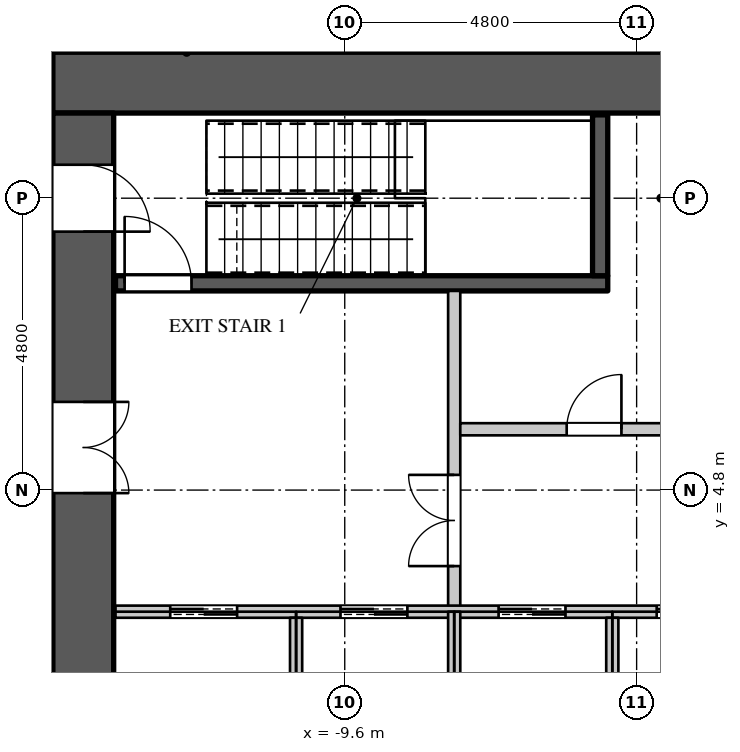
"""IFC4 building model, lengths in metres.
Left out: names, types, materials, properties, quantities, classifications, styles, units other than length and angle.
Written with IfcOpenShell. Run it as: python <this file> out.ifc"""

import sys

from ifc_helpers import new_model, si_unit, direction, frame, frame_2d, origin, place, context, subcontext, project, spatial, rectangle, extrude, element, fill, save


model = new_model("IFC4")
c1 = context("Model", 3, precision=1e-05, world=origin(), true_north=direction((0.0, 1.0)))
c2 = subcontext(c1, "Body", "Model", "MODEL_VIEW")
j1 = project(units=[si_unit("LENGTHUNIT", "METRE"), si_unit("PLANEANGLEUNIT", "RADIAN")], contexts=[c1])
p1 = place(None, origin())
s1 = spatial("IfcSite", under=j1, at=p1, CompositionType="ELEMENT")
p2 = place(p1, origin())
s2 = spatial("IfcBuilding", under=s1, at=p2, CompositionType="ELEMENT")
p3 = place(p2, frame((0.0, 0.0, 38.1)))
s3 = spatial("IfcBuildingStorey", under=s2, at=p3, CompositionType="ELEMENT", Elevation=38.1)
p4 = place(p3, frame((-14.4, 11.5, 0.0), z_axis=(0.0, 0.0, 1.0), x_axis=(1.0, 0.0, 0.0)))
e1 = element("IfcWall", 1, at=p4, inside=s3, PredefinedType="SHEAR", context=c2, shape_type="SweptSolid", body=[
    extrude(rectangle(XDim=28.8, YDim=1.0, at=frame_2d((14.4, 0.0))), origin(), (0.0, 0.0, 1.0), 4.2),
])
p5 = place(p3, frame((-13.9, -11.0, 0.0), z_axis=(0.0, 0.0, 1.0), x_axis=(0.0, 1.0, 0.0)))
e2 = element("IfcWall", 2, at=p5, inside=s3, PredefinedType="SHEAR", context=c2, shape_type="SweptSolid", body=[
    extrude(rectangle(XDim=22.0, YDim=1.0, at=frame_2d((11.0, 0.0))), origin(), (0.0, 0.0, 1.0), 4.2),
])
p6 = place(p5, frame((20.05, 0.0, 0.0)))
e3 = element("IfcOpeningElement", 3, at=p6, cuts=e2, PredefinedType="OPENING", context=c2, shape_type="SweptSolid", body=[
    extrude(rectangle(XDim=1.1, YDim=2.2, at=frame_2d((0.55, 1.1))), frame((0.0, 0.51, 0.0), z_axis=(0.0, -1.0, 0.0), x_axis=(1.0, 0.0, 0.0)), (0.0, 0.0, 1.0), 1.02),
])
p7 = place(p5, frame((0.85, 0.0, 0.0)))
e4 = element("IfcOpeningElement", 4, at=p7, cuts=e2, PredefinedType="OPENING", context=c2, shape_type="SweptSolid", body=[
    extrude(rectangle(XDim=1.1, YDim=2.2, at=frame_2d((0.55, 1.1))), frame((0.0, 0.51, 0.0), z_axis=(0.0, -1.0, 0.0), x_axis=(1.0, 0.0, 0.0)), (0.0, 0.0, 1.0), 1.02),
])
p8 = place(p5, frame((15.75, 0.0, 0.0)))
e5 = element("IfcOpeningElement", 5, at=p8, cuts=e2, PredefinedType="OPENING", context=c2, shape_type="SweptSolid", body=[
    extrude(rectangle(XDim=1.5, YDim=2.4, at=frame_2d((0.75, 1.2))), frame((0.0, 0.51, 0.0), z_axis=(0.0, -1.0, 0.0), x_axis=(1.0, 0.0, 0.0)), (0.0, 0.0, 1.0), 1.02),
])
p9 = place(p5, frame((4.75, 0.0, 0.0)))
e6 = element("IfcOpeningElement", 6, at=p9, cuts=e2, PredefinedType="OPENING", context=c2, shape_type="SweptSolid", body=[
    extrude(rectangle(XDim=1.5, YDim=2.4, at=frame_2d((0.75, 1.2))), frame((0.0, 0.51, 0.0), z_axis=(0.0, -1.0, 0.0), x_axis=(1.0, 0.0, 0.0)), (0.0, 0.0, 1.0), 1.02),
])
p10 = place(p3, frame((-7.8, 2.8, 0.0), z_axis=(0.0, 0.0, 1.0), x_axis=(0.0, 1.0, 0.0)))
e7 = element("IfcWall", 7, at=p10, inside=s3, PredefinedType="PARTITIONING", context=c2, shape_type="SweptSolid", body=[
    extrude(rectangle(XDim=5.275, YDim=0.2, at=frame_2d((2.637, 0.0))), origin(), (0.0, 0.0, 1.0), 3.95),
])
p11 = place(p10, frame((0.75, 0.0, 0.0)))
e8 = element("IfcOpeningElement", 8, at=p11, cuts=e7, PredefinedType="OPENING", context=c2, shape_type="SweptSolid", body=[
    extrude(rectangle(XDim=1.5, YDim=2.4, at=frame_2d((0.75, 1.2))), frame((0.0, 0.11, 0.0), z_axis=(0.0, -1.0, 0.0), x_axis=(1.0, 0.0, 0.0)), (0.0, 0.0, 1.0), 0.22),
])
p12 = place(p3, frame((-7.7, 5.8, 0.0), z_axis=(0.0, 0.0, 1.0), x_axis=(1.0, 0.0, 0.0)))
e9 = element("IfcWall", 9, at=p12, inside=s3, PredefinedType="PARTITIONING", context=c2, shape_type="SweptSolid", body=[
    extrude(rectangle(XDim=16.32, YDim=0.2, at=frame_2d((8.16, 0.0))), origin(), (0.0, 0.0, 1.0), 3.95),
])
p13 = place(p12, frame((1.75, 0.0, 0.0)))
e10 = element("IfcOpeningElement", 10, at=p13, cuts=e9, PredefinedType="OPENING", context=c2, shape_type="SweptSolid", body=[
    extrude(rectangle(XDim=0.9, YDim=2.2, at=frame_2d((0.45, 1.1))), frame((0.0, 0.11, 0.0), z_axis=(0.0, -1.0, 0.0), x_axis=(1.0, 0.0, 0.0)), (0.0, 0.0, 1.0), 0.22),
])
p14 = place(p12, frame((6.4, 0.0, 0.0)))
e11 = element("IfcOpeningElement", 11, at=p14, cuts=e9, PredefinedType="OPENING", context=c2, shape_type="SweptSolid", body=[
    extrude(rectangle(XDim=0.9, YDim=2.2, at=frame_2d((0.45, 1.1))), frame((0.0, 0.11, 0.0), z_axis=(0.0, -1.0, 0.0), x_axis=(1.0, 0.0, 0.0)), (0.0, 0.0, 1.0), 0.22),
])
p15 = place(p12, frame((10.55, 0.0, 0.0)))
e12 = element("IfcOpeningElement", 12, at=p15, cuts=e9, PredefinedType="OPENING", context=c2, shape_type="SweptSolid", body=[
    extrude(rectangle(XDim=0.9, YDim=2.2, at=frame_2d((0.45, 1.1))), frame((0.0, 0.11, 0.0), z_axis=(0.0, -1.0, 0.0), x_axis=(1.0, 0.0, 0.0)), (0.0, 0.0, 1.0), 0.22),
])
p16 = place(p12, frame((13.9, 0.0, 0.0)))
e13 = element("IfcOpeningElement", 13, at=p16, cuts=e9, PredefinedType="OPENING", context=c2, shape_type="SweptSolid", body=[
    extrude(rectangle(XDim=0.9, YDim=2.2, at=frame_2d((0.45, 1.1))), frame((0.0, 0.11, 0.0), z_axis=(0.0, -1.0, 0.0), x_axis=(1.0, 0.0, 0.0)), (0.0, 0.0, 1.0), 0.22),
])
p17 = place(p3, frame((-13.37, 2.8, 0.0), z_axis=(0.0, 0.0, 1.0), x_axis=(1.0, 0.0, 0.0)))
e14 = element("IfcWall", 14, at=p17, inside=s3, PredefinedType="PARTITIONING", context=c2, shape_type="SweptSolid", body=[
    extrude(rectangle(XDim=23.77, YDim=0.2, at=frame_2d((11.885, 0.0))), origin(), (0.0, 0.0, 1.0), 3.95),
])
p18 = place(p17, frame((0.9, 0.0, 0.0)))
e15 = element("IfcOpeningElement", 15, at=p18, cuts=e14, PredefinedType="OPENING", context=c2, shape_type="SweptSolid", body=[
    extrude(rectangle(XDim=1.1, YDim=2.2, at=frame_2d((0.55, 1.1))), frame((0.0, 0.11, 0.0), z_axis=(0.0, -1.0, 0.0), x_axis=(1.0, 0.0, 0.0)), (0.0, 0.0, 1.0), 0.22),
])
p19 = place(p17, frame((3.7, 0.0, 0.0)))
e16 = element("IfcOpeningElement", 16, at=p19, cuts=e14, PredefinedType="OPENING", context=c2, shape_type="SweptSolid", body=[
    extrude(rectangle(XDim=1.1, YDim=2.2, at=frame_2d((0.55, 1.1))), frame((0.0, 0.11, 0.0), z_axis=(0.0, -1.0, 0.0), x_axis=(1.0, 0.0, 0.0)), (0.0, 0.0, 1.0), 0.22),
])
p20 = place(p17, frame((6.3, 0.0, 0.0)))
e17 = element("IfcOpeningElement", 17, at=p20, cuts=e14, PredefinedType="OPENING", context=c2, shape_type="SweptSolid", body=[
    extrude(rectangle(XDim=1.1, YDim=2.2, at=frame_2d((0.55, 1.1))), frame((0.0, 0.11, 0.0), z_axis=(0.0, -1.0, 0.0), x_axis=(1.0, 0.0, 0.0)), (0.0, 0.0, 1.0), 0.22),
])
p21 = place(p17, frame((8.9, 0.0, 0.0)))
e18 = element("IfcOpeningElement", 18, at=p21, cuts=e14, PredefinedType="OPENING", context=c2, shape_type="SweptSolid", body=[
    extrude(rectangle(XDim=1.1, YDim=2.2, at=frame_2d((0.55, 1.1))), frame((0.0, 0.11, 0.0), z_axis=(0.0, -1.0, 0.0), x_axis=(1.0, 0.0, 0.0)), (0.0, 0.0, 1.0), 0.22),
])
p22 = place(p17, frame((11.5, 0.0, 0.0)))
e19 = element("IfcOpeningElement", 19, at=p22, cuts=e14, PredefinedType="OPENING", context=c2, shape_type="SweptSolid", body=[
    extrude(rectangle(XDim=1.1, YDim=2.2, at=frame_2d((0.55, 1.1))), frame((0.0, 0.11, 0.0), z_axis=(0.0, -1.0, 0.0), x_axis=(1.0, 0.0, 0.0)), (0.0, 0.0, 1.0), 0.22),
])
p23 = place(p17, frame((14.1, 0.0, 0.0)))
e20 = element("IfcOpeningElement", 20, at=p23, cuts=e14, PredefinedType="OPENING", context=c2, shape_type="SweptSolid", body=[
    extrude(rectangle(XDim=1.1, YDim=2.2, at=frame_2d((0.55, 1.1))), frame((0.0, 0.11, 0.0), z_axis=(0.0, -1.0, 0.0), x_axis=(1.0, 0.0, 0.0)), (0.0, 0.0, 1.0), 0.22),
])
p24 = place(p17, frame((16.7, 0.0, 0.0)))
e21 = element("IfcOpeningElement", 21, at=p24, cuts=e14, PredefinedType="OPENING", context=c2, shape_type="SweptSolid", body=[
    extrude(rectangle(XDim=1.1, YDim=2.2, at=frame_2d((0.55, 1.1))), frame((0.0, 0.11, 0.0), z_axis=(0.0, -1.0, 0.0), x_axis=(1.0, 0.0, 0.0)), (0.0, 0.0, 1.0), 0.22),
])
p25 = place(p17, frame((19.3, 0.0, 0.0)))
e22 = element("IfcOpeningElement", 22, at=p25, cuts=e14, PredefinedType="OPENING", context=c2, shape_type="SweptSolid", body=[
    extrude(rectangle(XDim=1.1, YDim=2.2, at=frame_2d((0.55, 1.1))), frame((0.0, 0.11, 0.0), z_axis=(0.0, -1.0, 0.0), x_axis=(1.0, 0.0, 0.0)), (0.0, 0.0, 1.0), 0.22),
])
p26 = place(p3, frame((-10.4, 0.0, 0.0), z_axis=(0.0, 0.0, 1.0), x_axis=(0.0, 1.0, 0.0)))
e23 = element("IfcWall", 23, at=p26, inside=s3, PredefinedType="PARTITIONING", context=c2, shape_type="SweptSolid", body=[
    extrude(rectangle(XDim=2.7, YDim=0.2, at=frame_2d((1.35, 0.0))), origin(), (0.0, 0.0, 1.0), 3.95),
])
p27 = place(p3, frame((-7.8, 0.0, 0.0), z_axis=(0.0, 0.0, 1.0), x_axis=(0.0, 1.0, 0.0)))
e24 = element("IfcWall", 24, at=p27, inside=s3, PredefinedType="PARTITIONING", context=c2, shape_type="SweptSolid", body=[
    extrude(rectangle(XDim=2.8, YDim=0.2, at=frame_2d((1.4, 0.0))), origin(), (0.0, 0.0, 1.0), 3.95),
])
p28 = place(p3, frame((-5.2, 0.1, 0.0), z_axis=(0.0, 0.0, 1.0), x_axis=(0.0, 1.0, 0.0)))
e25 = element("IfcWall", 25, at=p28, inside=s3, PredefinedType="PARTITIONING", context=c2, shape_type="SweptSolid", body=[
    extrude(rectangle(XDim=2.6, YDim=0.2, at=frame_2d((1.3, 0.0))), origin(), (0.0, 0.0, 1.0), 3.95),
])
p29 = place(p3, frame((-13.37, 8.2, 0.0), z_axis=(0.0, 0.0, 1.0), x_axis=(1.0, 0.0, 0.0)))
e26 = element("IfcWall", 26, at=p29, inside=s3, PredefinedType="SHEAR", context=c2, shape_type="SweptSolid", body=[
    extrude(rectangle(XDim=8.095, YDim=0.25, at=frame_2d((4.048, 0.0))), origin(), (0.0, 0.0, 1.0), 3.95),
])
p30 = place(p29, frame((0.15, 0.0, 0.0)))
e27 = element("IfcOpeningElement", 27, at=p30, cuts=e26, PredefinedType="OPENING", context=c2, shape_type="SweptSolid", body=[
    extrude(rectangle(XDim=1.1, YDim=2.2, at=frame_2d((0.55, 1.1))), frame((0.0, 0.135, 0.0), z_axis=(0.0, -1.0, 0.0), x_axis=(1.0, 0.0, 0.0)), (0.0, 0.0, 1.0), 0.27),
])
p31 = place(p3, frame((-5.4, 8.325, 0.0), z_axis=(0.0, 0.0, 1.0), x_axis=(0.0, 1.0, 0.0)))
e28 = element("IfcWall", 28, at=p31, inside=s3, PredefinedType="SHEAR", context=c2, shape_type="SweptSolid", body=[
    extrude(rectangle(XDim=2.645, YDim=0.25, at=frame_2d((1.323, 0.0))), origin(), (0.0, 0.0, 1.0), 3.95),
])
p32 = place(p13, origin())
e29 = element("IfcDoor", 29, at=p32, inside=s3, OperationType="SINGLE_SWING_RIGHT", PredefinedType="DOOR", context=c2, shape_type="SweptSolid", body=[
    extrude(rectangle(XDim=0.9, YDim=2.2, at=frame_2d((0.45, 1.1))), frame((0.0, 0.025, 0.0), z_axis=(0.0, -1.0, 0.0), x_axis=(1.0, 0.0, 0.0)), (0.0, 0.0, 1.0), 0.05),
])
fill(e10, e29)
p33 = place(p18, origin())
e30 = element("IfcDoor", 30, at=p33, inside=s3, OperationType="DOUBLE_DOOR_SLIDING", PredefinedType="DOOR", context=c2, shape_type="SweptSolid", body=[
    extrude(rectangle(XDim=1.1, YDim=2.2, at=frame_2d((0.55, 1.1))), frame((0.0, 0.025, 0.0), z_axis=(0.0, -1.0, 0.0), x_axis=(1.0, 0.0, 0.0)), (0.0, 0.0, 1.0), 0.05),
])
fill(e15, e30)
p34 = place(p19, origin())
e31 = element("IfcDoor", 31, at=p34, inside=s3, OperationType="DOUBLE_DOOR_SLIDING", PredefinedType="DOOR", context=c2, shape_type="SweptSolid", body=[
    extrude(rectangle(XDim=1.1, YDim=2.2, at=frame_2d((0.55, 1.1))), frame((0.0, 0.025, 0.0), z_axis=(0.0, -1.0, 0.0), x_axis=(1.0, 0.0, 0.0)), (0.0, 0.0, 1.0), 0.05),
])
fill(e16, e31)
p35 = place(p20, origin())
e32 = element("IfcDoor", 32, at=p35, inside=s3, OperationType="DOUBLE_DOOR_SLIDING", PredefinedType="DOOR", context=c2, shape_type="SweptSolid", body=[
    extrude(rectangle(XDim=1.1, YDim=2.2, at=frame_2d((0.55, 1.1))), frame((0.0, 0.025, 0.0), z_axis=(0.0, -1.0, 0.0), x_axis=(1.0, 0.0, 0.0)), (0.0, 0.0, 1.0), 0.05),
])
fill(e17, e32)
p36 = place(p21, origin())
e33 = element("IfcDoor", 33, at=p36, inside=s3, OperationType="DOUBLE_DOOR_SLIDING", PredefinedType="DOOR", context=c2, shape_type="SweptSolid", body=[
    extrude(rectangle(XDim=1.1, YDim=2.2, at=frame_2d((0.55, 1.1))), frame((0.0, 0.025, 0.0), z_axis=(0.0, -1.0, 0.0), x_axis=(1.0, 0.0, 0.0)), (0.0, 0.0, 1.0), 0.05),
])
fill(e18, e33)
p37 = place(p30, origin())
e34 = element("IfcDoor", 34, at=p37, inside=s3, OperationType="SINGLE_SWING_LEFT", PredefinedType="DOOR", context=c2, shape_type="SweptSolid", body=[
    extrude(rectangle(XDim=1.1, YDim=2.2, at=frame_2d((0.55, 1.1))), frame((0.0, 0.025, 0.0), z_axis=(0.0, -1.0, 0.0), x_axis=(1.0, 0.0, 0.0)), (0.0, 0.0, 1.0), 0.05),
])
fill(e27, e34)
p38 = place(p11, origin())
e35 = element("IfcDoor", 35, at=p38, inside=s3, OperationType="DOUBLE_DOOR_SINGLE_SWING", PredefinedType="DOOR", context=c2, shape_type="SweptSolid", body=[
    extrude(rectangle(XDim=1.5, YDim=2.4, at=frame_2d((0.75, 1.2))), frame((0.0, 0.025, 0.0), z_axis=(0.0, -1.0, 0.0), x_axis=(1.0, 0.0, 0.0)), (0.0, 0.0, 1.0), 0.05),
])
fill(e8, e35)
p39 = place(p6, origin())
e36 = element("IfcDoor", 36, at=p39, inside=s3, OperationType="SINGLE_SWING_RIGHT", PredefinedType="DOOR", context=c2, shape_type="SweptSolid", body=[
    extrude(rectangle(XDim=1.1, YDim=2.2, at=frame_2d((0.55, 1.1))), frame((0.0, -0.445, 0.0), z_axis=(0.0, -1.0, 0.0), x_axis=(1.0, 0.0, 0.0)), (0.0, 0.0, 1.0), 0.05),
])
fill(e3, e36)
p40 = place(p8, origin())
e37 = element("IfcDoor", 37, at=p40, inside=s3, OperationType="DOUBLE_DOOR_SINGLE_SWING", PredefinedType="DOOR", context=c2, shape_type="SweptSolid", body=[
    extrude(rectangle(XDim=1.5, YDim=2.4, at=frame_2d((0.75, 1.2))), frame((0.0, -0.445, 0.0), z_axis=(0.0, -1.0, 0.0), x_axis=(1.0, 0.0, 0.0)), (0.0, 0.0, 1.0), 0.05),
])
fill(e5, e37)
save(model, sys.argv[1])
